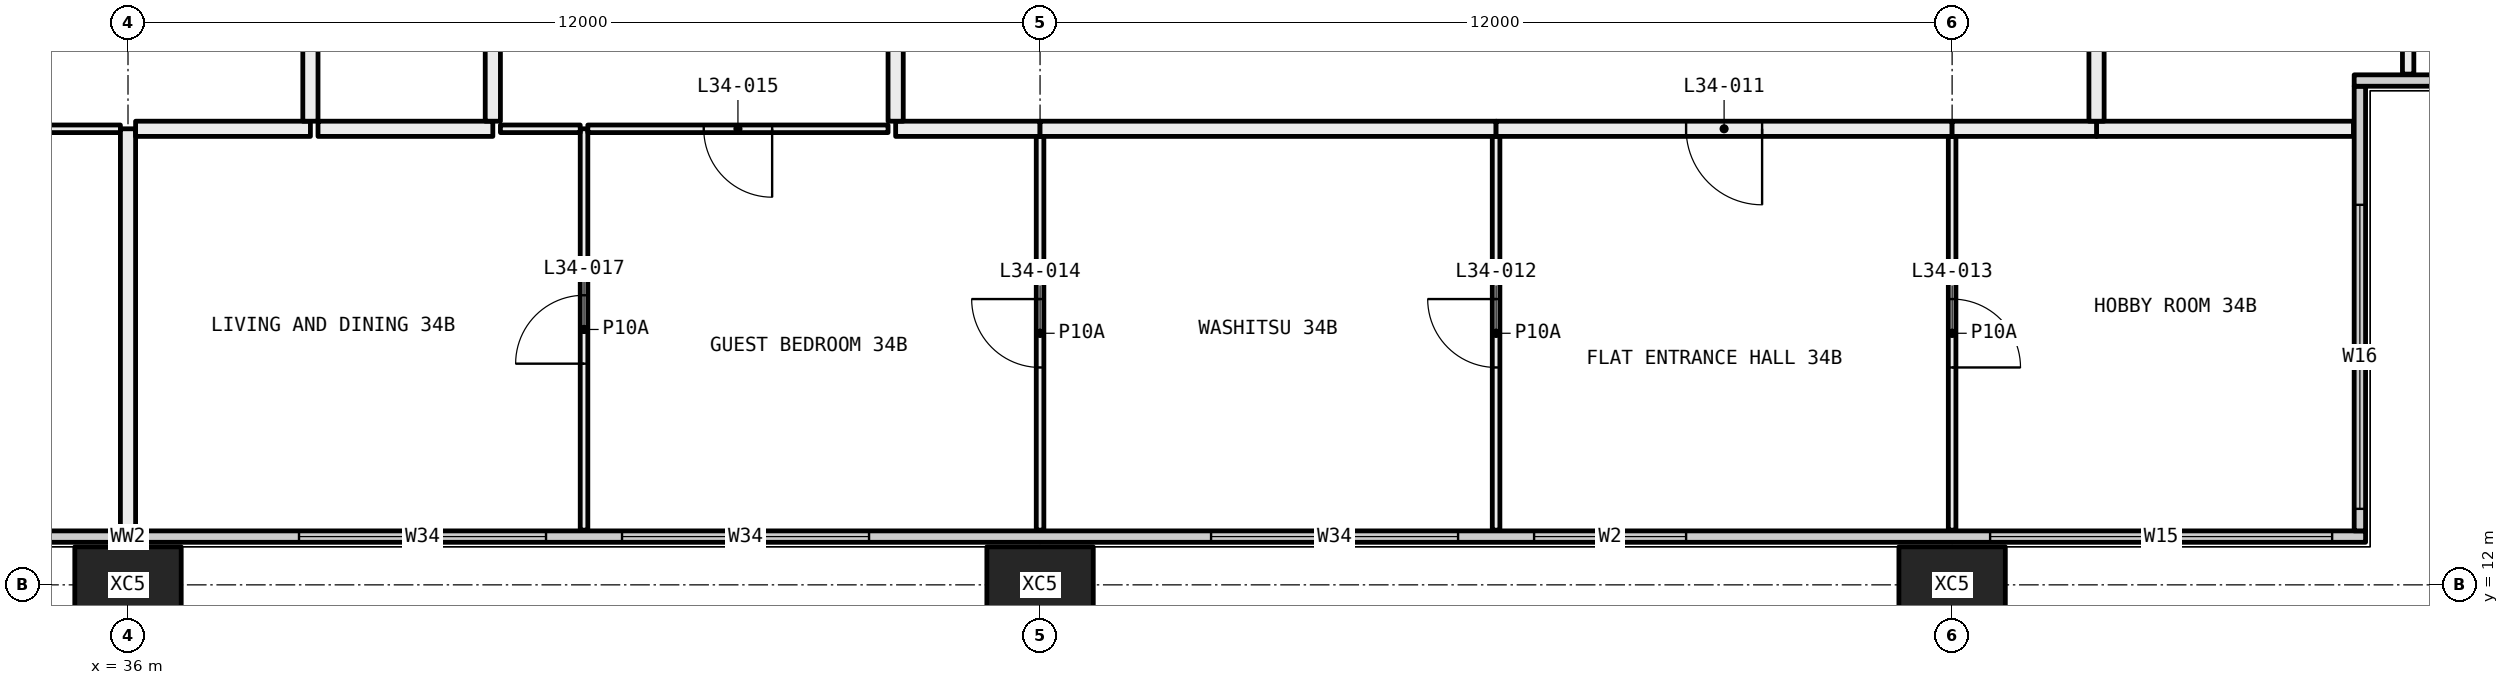
"""IFC4 building model, lengths in metres.
Left out: names, types, materials, properties, quantities, classifications, styles, units other than length and angle.
Written with IfcOpenShell. Run it as: python <this file> out.ifc"""

import sys

from ifc_helpers import new_model, si_unit, direction, frame, frame_2d, origin, origin_2d, place, context, subcontext, project, spatial, rectangle, hollow_rectangle, extrude, element, fill, save


model = new_model("IFC4")
c1 = context("Model", 3, precision=1e-05, world=origin(), true_north=direction((0.0, 1.0)))
c2 = subcontext(c1, "Body", "Model", "MODEL_VIEW")
j1 = project(units=[si_unit("LENGTHUNIT", "METRE"), si_unit("PLANEANGLEUNIT", "RADIAN")], contexts=[c1])
p1 = place(None, origin())
s1 = spatial("IfcSite", under=j1, at=p1, CompositionType="ELEMENT")
p2 = place(p1, origin())
s2 = spatial("IfcBuilding", under=s1, at=p2, CompositionType="ELEMENT")
p3 = place(p2, frame((0.0, 0.0, 131.1)))
s3 = spatial("IfcBuildingStorey", under=s2, at=p3, CompositionType="ELEMENT", Elevation=131.1)
for number, where, z_axis, x_axis in (
    (1, (36.0, 12.0, -0.4), (0.0, 0.0, 1.0), (1.0, 0.0, 0.0)),
    (2, (48.0, 12.0, -0.4), (0.0, 0.0, 1.0), (1.0, 0.0, 0.0)),
    (3, (60.0, 12.0, -0.4), (0.0, 0.0, 1.0), (1.0, 0.0, 0.0)),
):
    element("IfcColumn", number, at=place(p3, frame(where, z_axis=z_axis, x_axis=x_axis)), inside=s3, PredefinedType="COLUMN", context=c2, shape_type="SweptSolid", body=[
        extrude(hollow_rectangle(XDim=1.4, YDim=1.0, WallThickness=0.055, at=origin_2d()), origin(), (0.0, 0.0, 1.0), 3.45),
    ])
p4 = place(p3, frame((6.56, 12.635, 0.0), z_axis=(0.0, 0.0, 1.0), x_axis=(1.0, 0.0, 0.0)))
e4 = element("IfcWall", 4, at=p4, inside=s3, PredefinedType="ELEMENTEDWALL", context=c2, shape_type="SweptSolid", body=[
    extrude(rectangle(XDim=58.88, YDim=0.15, at=frame_2d((29.44, 0.0))), origin(), (0.0, 0.0, 1.0), 3.05),
])
p5 = place(p4, frame((0.44, 0.0, 0.45)))
e5 = element("IfcOpeningElement", 5, at=p5, cuts=e4, PredefinedType="OPENING", context=c2, shape_type="SweptSolid", body=[
    extrude(rectangle(XDim=4.5, YDim=2.55, at=frame_2d((2.25, 1.275))), frame((0.0, 0.085, 0.0), z_axis=(0.0, -1.0, 0.0), x_axis=(1.0, 0.0, 0.0)), (0.0, 0.0, 1.0), 0.17),
])
p6 = place(p4, frame((7.69, 0.0, 0.45)))
e6 = element("IfcOpeningElement", 6, at=p6, cuts=e4, PredefinedType="OPENING", context=c2, shape_type="SweptSolid", body=[
    extrude(rectangle(XDim=3.25, YDim=2.55, at=frame_2d((1.625, 1.275))), frame((0.0, 0.085, 0.0), z_axis=(0.0, -1.0, 0.0), x_axis=(1.0, 0.0, 0.0)), (0.0, 0.0, 1.0), 0.17),
])
p7 = place(p4, frame((11.94, 0.0, 0.45)))
e7 = element("IfcOpeningElement", 7, at=p7, cuts=e4, PredefinedType="OPENING", context=c2, shape_type="SweptSolid", body=[
    extrude(rectangle(XDim=3.25, YDim=2.55, at=frame_2d((1.625, 1.275))), frame((0.0, 0.085, 0.0), z_axis=(0.0, -1.0, 0.0), x_axis=(1.0, 0.0, 0.0)), (0.0, 0.0, 1.0), 0.17),
])
p8 = place(p4, frame((19.69, 0.0, 0.45)))
e8 = element("IfcOpeningElement", 8, at=p8, cuts=e4, PredefinedType="OPENING", context=c2, shape_type="SweptSolid", body=[
    extrude(rectangle(XDim=3.25, YDim=2.55, at=frame_2d((1.625, 1.275))), frame((0.0, 0.085, 0.0), z_axis=(0.0, -1.0, 0.0), x_axis=(1.0, 0.0, 0.0)), (0.0, 0.0, 1.0), 0.17),
])
p9 = place(p4, frame((23.94, 0.0, 0.45)))
e9 = element("IfcOpeningElement", 9, at=p9, cuts=e4, PredefinedType="OPENING", context=c2, shape_type="SweptSolid", body=[
    extrude(rectangle(XDim=2.0, YDim=2.55, at=frame_2d((1.0, 1.275))), frame((0.0, 0.085, 0.0), z_axis=(0.0, -1.0, 0.0), x_axis=(1.0, 0.0, 0.0)), (0.0, 0.0, 1.0), 0.17),
])
p10 = place(p4, frame((31.69, 0.0, 0.45)))
e10 = element("IfcOpeningElement", 10, at=p10, cuts=e4, PredefinedType="OPENING", context=c2, shape_type="SweptSolid", body=[
    extrude(rectangle(XDim=3.25, YDim=2.55, at=frame_2d((1.625, 1.275))), frame((0.0, 0.085, 0.0), z_axis=(0.0, -1.0, 0.0), x_axis=(1.0, 0.0, 0.0)), (0.0, 0.0, 1.0), 0.17),
])
p11 = place(p4, frame((35.94, 0.0, 0.45)))
e11 = element("IfcOpeningElement", 11, at=p11, cuts=e4, PredefinedType="OPENING", context=c2, shape_type="SweptSolid", body=[
    extrude(rectangle(XDim=3.25, YDim=2.55, at=frame_2d((1.625, 1.275))), frame((0.0, 0.085, 0.0), z_axis=(0.0, -1.0, 0.0), x_axis=(1.0, 0.0, 0.0)), (0.0, 0.0, 1.0), 0.17),
])
p12 = place(p4, frame((43.69, 0.0, 0.45)))
e12 = element("IfcOpeningElement", 12, at=p12, cuts=e4, PredefinedType="OPENING", context=c2, shape_type="SweptSolid", body=[
    extrude(rectangle(XDim=3.25, YDim=2.55, at=frame_2d((1.625, 1.275))), frame((0.0, 0.085, 0.0), z_axis=(0.0, -1.0, 0.0), x_axis=(1.0, 0.0, 0.0)), (0.0, 0.0, 1.0), 0.17),
])
p13 = place(p4, frame((47.94, 0.0, 0.45)))
e13 = element("IfcOpeningElement", 13, at=p13, cuts=e4, PredefinedType="OPENING", context=c2, shape_type="SweptSolid", body=[
    extrude(rectangle(XDim=2.0, YDim=2.55, at=frame_2d((1.0, 1.275))), frame((0.0, 0.085, 0.0), z_axis=(0.0, -1.0, 0.0), x_axis=(1.0, 0.0, 0.0)), (0.0, 0.0, 1.0), 0.17),
])
p14 = place(p4, frame((53.94, 0.0, 0.45)))
e14 = element("IfcOpeningElement", 14, at=p14, cuts=e4, PredefinedType="OPENING", context=c2, shape_type="SweptSolid", body=[
    extrude(rectangle(XDim=4.5, YDim=2.55, at=frame_2d((2.25, 1.275))), frame((0.0, 0.085, 0.0), z_axis=(0.0, -1.0, 0.0), x_axis=(1.0, 0.0, 0.0)), (0.0, 0.0, 1.0), 0.17),
])
p15 = place(p3, frame((65.365, 12.71, 0.0), z_axis=(0.0, 0.0, 1.0), x_axis=(0.0, 1.0, 0.0)))
e15 = element("IfcWall", 15, at=p15, inside=s3, PredefinedType="ELEMENTEDWALL", context=c2, shape_type="SweptSolid", body=[
    extrude(rectangle(XDim=5.85, YDim=0.15, at=frame_2d((2.925, 0.0))), origin(), (0.0, 0.0, 1.0), 3.05),
])
p16 = place(p15, frame((0.29, 0.0, 0.45)))
e16 = element("IfcOpeningElement", 16, at=p16, cuts=e15, PredefinedType="OPENING", context=c2, shape_type="SweptSolid", body=[
    extrude(rectangle(XDim=4.0, YDim=2.55, at=frame_2d((2.0, 1.275))), frame((0.0, 0.085, 0.0), z_axis=(0.0, -1.0, 0.0), x_axis=(1.0, 0.0, 0.0)), (0.0, 0.0, 1.0), 0.17),
])
p17 = place(p3, frame((65.29, 18.635, 0.0), z_axis=(0.0, 0.0, 1.0), x_axis=(1.0, 0.0, 0.0)))
e17 = element("IfcWall", 17, at=p17, inside=s3, PredefinedType="ELEMENTEDWALL", context=c2, shape_type="SweptSolid", body=[
    extrude(rectangle(XDim=6.15, YDim=0.15, at=frame_2d((3.075, 0.0))), origin(), (0.0, 0.0, 1.0), 3.05),
])
p18 = place(p17, frame((1.71, 0.0, 0.45)))
e18 = element("IfcOpeningElement", 18, at=p18, cuts=e17, PredefinedType="OPENING", context=c2, shape_type="SweptSolid", body=[
    extrude(rectangle(XDim=4.0, YDim=2.55, at=frame_2d((2.0, 1.275))), frame((0.0, 0.085, 0.0), z_axis=(0.0, -1.0, 0.0), x_axis=(1.0, 0.0, 0.0)), (0.0, 0.0, 1.0), 0.17),
])
p19 = place(p3, frame((35.9, 18.0, 0.0), z_axis=(0.0, 0.0, 1.0), x_axis=(-1.0, 0.0, 0.0)))
e19 = element("IfcWall", 19, at=p19, inside=s3, PredefinedType="PARTITIONING", context=c2, shape_type="SweptSolid", body=[
    extrude(rectangle(XDim=1.4, YDim=0.1, at=frame_2d((0.7, 0.0))), origin(), (0.0, 0.0, 1.0), 3.05),
])
p20 = place(p3, frame((36.0, 12.72, 0.0), z_axis=(0.0, 0.0, 1.0), x_axis=(0.0, 1.0, 0.0)))
e20 = element("IfcWall", 20, at=p20, inside=s3, PredefinedType="PARTITIONING", context=c2, shape_type="SweptSolid", body=[
    extrude(rectangle(XDim=5.28, YDim=0.2, at=frame_2d((2.64, 0.0))), origin(), (0.0, 0.0, 1.0), 2.45),
])
p21 = place(p3, frame((36.1, 18.0, 0.0), z_axis=(0.0, 0.0, 1.0), x_axis=(1.0, 0.0, 0.0)))
e21 = element("IfcWall", 21, at=p21, inside=s3, PredefinedType="PARTITIONING", context=c2, shape_type="SweptSolid", body=[
    extrude(rectangle(XDim=2.3, YDim=0.2, at=frame_2d((1.15, 0.0))), origin(), (0.0, 0.0, 1.0), 3.05),
])
p22 = place(p3, frame((38.4, 18.1, 0.0), z_axis=(0.0, 0.0, 1.0), x_axis=(0.0, 1.0, 0.0)))
e22 = element("IfcWall", 22, at=p22, inside=s3, PredefinedType="PARTITIONING", context=c2, shape_type="SweptSolid", body=[
    extrude(rectangle(XDim=6.2, YDim=0.2, at=frame_2d((3.1, 0.0))), origin(), (0.0, 0.0, 1.0), 2.45),
])
p23 = place(p3, frame((42.0, 12.72, 0.0), z_axis=(0.0, 0.0, 1.0), x_axis=(0.0, 1.0, 0.0)))
e23 = element("IfcWall", 23, at=p23, inside=s3, PredefinedType="PARTITIONING", context=c2, shape_type="SweptSolid", body=[
    extrude(rectangle(XDim=5.28, YDim=0.1, at=frame_2d((2.64, 0.0))), origin(), (0.0, 0.0, 1.0), 3.05),
])
p24 = place(p23, frame((2.19, 0.0, 0.0)))
e24 = element("IfcOpeningElement", 24, at=p24, cuts=e23, PredefinedType="OPENING", context=c2, shape_type="SweptSolid", body=[
    extrude(rectangle(XDim=0.9, YDim=2.1, at=frame_2d((0.45, 1.05))), frame((0.0, 0.06, 0.0), z_axis=(0.0, -1.0, 0.0), x_axis=(1.0, 0.0, 0.0)), (0.0, 0.0, 1.0), 0.12),
])
p25 = place(p3, frame((41.95, 18.0, 0.0), z_axis=(0.0, 0.0, 1.0), x_axis=(-1.0, 0.0, 0.0)))
e25 = element("IfcWall", 25, at=p25, inside=s3, PredefinedType="PARTITIONING", context=c2, shape_type="SweptSolid", body=[
    extrude(rectangle(XDim=1.05, YDim=0.1, at=frame_2d((0.525, 0.0))), origin(), (0.0, 0.0, 1.0), 3.05),
])
p26 = place(p3, frame((40.8, 18.0, 0.0), z_axis=(0.0, 0.0, 1.0), x_axis=(-1.0, 0.0, 0.0)))
e26 = element("IfcWall", 26, at=p26, inside=s3, PredefinedType="PARTITIONING", context=c2, shape_type="SweptSolid", body=[
    extrude(rectangle(XDim=2.3, YDim=0.2, at=frame_2d((1.15, 0.0))), origin(), (0.0, 0.0, 1.0), 3.05),
])
p27 = place(p3, frame((48.0, 12.72, 0.0), z_axis=(0.0, 0.0, 1.0), x_axis=(0.0, 1.0, 0.0)))
e27 = element("IfcWall", 27, at=p27, inside=s3, PredefinedType="PARTITIONING", context=c2, shape_type="SweptSolid", body=[
    extrude(rectangle(XDim=5.18, YDim=0.1, at=frame_2d((2.59, 0.0))), origin(), (0.0, 0.0, 1.0), 3.05),
])
p28 = place(p27, frame((2.14, 0.0, 0.0)))
e28 = element("IfcOpeningElement", 28, at=p28, cuts=e27, PredefinedType="OPENING", context=c2, shape_type="SweptSolid", body=[
    extrude(rectangle(XDim=0.9, YDim=2.1, at=frame_2d((0.45, 1.05))), frame((0.0, 0.06, 0.0), z_axis=(0.0, -1.0, 0.0), x_axis=(1.0, 0.0, 0.0)), (0.0, 0.0, 1.0), 0.12),
])
p29 = place(p3, frame((46.0, 18.0, 0.0), z_axis=(0.0, 0.0, 1.0), x_axis=(-1.0, 0.0, 0.0)))
e29 = element("IfcWall", 29, at=p29, inside=s3, PredefinedType="PARTITIONING", context=c2, shape_type="SweptSolid", body=[
    extrude(rectangle(XDim=3.95, YDim=0.1, at=frame_2d((1.975, 0.0))), origin(), (0.0, 0.0, 1.0), 3.05),
])
p30 = place(p29, frame((1.525, 0.0, 0.0)))
e30 = element("IfcOpeningElement", 30, at=p30, cuts=e29, PredefinedType="OPENING", context=c2, shape_type="SweptSolid", body=[
    extrude(rectangle(XDim=0.9, YDim=2.1, at=frame_2d((0.45, 1.05))), frame((0.0, 0.06, 0.0), z_axis=(0.0, -1.0, 0.0), x_axis=(1.0, 0.0, 0.0)), (0.0, 0.0, 1.0), 0.12),
])
p31 = place(p3, frame((48.0, 18.0, 0.0), z_axis=(0.0, 0.0, 1.0), x_axis=(-1.0, 0.0, 0.0)))
e31 = element("IfcWall", 31, at=p31, inside=s3, PredefinedType="PARTITIONING", context=c2, shape_type="SweptSolid", body=[
    extrude(rectangle(XDim=1.9, YDim=0.2, at=frame_2d((0.95, 0.0))), origin(), (0.0, 0.0, 1.0), 3.05),
])
p32 = place(p3, frame((54.0, 12.72, 0.0), z_axis=(0.0, 0.0, 1.0), x_axis=(0.0, 1.0, 0.0)))
e32 = element("IfcWall", 32, at=p32, inside=s3, PredefinedType="PARTITIONING", context=c2, shape_type="SweptSolid", body=[
    extrude(rectangle(XDim=5.18, YDim=0.1, at=frame_2d((2.59, 0.0))), origin(), (0.0, 0.0, 1.0), 3.05),
])
p33 = place(p32, frame((2.14, 0.0, 0.0)))
e33 = element("IfcOpeningElement", 33, at=p33, cuts=e32, PredefinedType="OPENING", context=c2, shape_type="SweptSolid", body=[
    extrude(rectangle(XDim=0.9, YDim=2.1, at=frame_2d((0.45, 1.05))), frame((0.0, 0.06, 0.0), z_axis=(0.0, -1.0, 0.0), x_axis=(1.0, 0.0, 0.0)), (0.0, 0.0, 1.0), 0.12),
])
p34 = place(p3, frame((54.0, 18.0, 0.0), z_axis=(0.0, 0.0, 1.0), x_axis=(-1.0, 0.0, 0.0)))
e34 = element("IfcWall", 34, at=p34, inside=s3, PredefinedType="PARTITIONING", context=c2, shape_type="SweptSolid", body=[
    extrude(rectangle(XDim=6.0, YDim=0.2, at=frame_2d((3.0, 0.0))), origin(), (0.0, 0.0, 1.0), 3.05),
])
p35 = place(p3, frame((60.0, 12.72, 0.0), z_axis=(0.0, 0.0, 1.0), x_axis=(0.0, 1.0, 0.0)))
e35 = element("IfcWall", 35, at=p35, inside=s3, PredefinedType="PARTITIONING", context=c2, shape_type="SweptSolid", body=[
    extrude(rectangle(XDim=5.18, YDim=0.1, at=frame_2d((2.59, 0.0))), origin(), (0.0, 0.0, 1.0), 3.05),
])
p36 = place(p35, frame((2.14, 0.0, 0.0)))
e36 = element("IfcOpeningElement", 36, at=p36, cuts=e35, PredefinedType="OPENING", context=c2, shape_type="SweptSolid", body=[
    extrude(rectangle(XDim=0.9, YDim=2.1, at=frame_2d((0.45, 1.05))), frame((0.0, 0.06, 0.0), z_axis=(0.0, -1.0, 0.0), x_axis=(1.0, 0.0, 0.0)), (0.0, 0.0, 1.0), 0.12),
])
p37 = place(p3, frame((60.0, 18.0, 0.0), z_axis=(0.0, 0.0, 1.0), x_axis=(-1.0, 0.0, 0.0)))
e37 = element("IfcWall", 37, at=p37, inside=s3, PredefinedType="PARTITIONING", context=c2, shape_type="SweptSolid", body=[
    extrude(rectangle(XDim=6.0, YDim=0.2, at=frame_2d((3.0, 0.0))), origin(), (0.0, 0.0, 1.0), 3.05),
])
p38 = place(p37, frame((2.5, 0.0, 0.0)))
e38 = element("IfcOpeningElement", 38, at=p38, cuts=e37, PredefinedType="OPENING", context=c2, shape_type="SweptSolid", body=[
    extrude(rectangle(XDim=1.0, YDim=2.1, at=frame_2d((0.5, 1.05))), frame((0.0, 0.11, 0.0), z_axis=(0.0, -1.0, 0.0), x_axis=(1.0, 0.0, 0.0)), (0.0, 0.0, 1.0), 0.22),
])
p39 = place(p3, frame((65.28, 18.0, 0.0), z_axis=(0.0, 0.0, 1.0), x_axis=(-1.0, 0.0, 0.0)))
e39 = element("IfcWall", 39, at=p39, inside=s3, PredefinedType="PARTITIONING", context=c2, shape_type="SweptSolid", body=[
    extrude(rectangle(XDim=3.38, YDim=0.2, at=frame_2d((1.69, 0.0))), origin(), (0.0, 0.0, 1.0), 3.05),
])
p40 = place(p3, frame((61.9, 18.0, 0.0), z_axis=(0.0, 0.0, 1.0), x_axis=(-1.0, 0.0, 0.0)))
e40 = element("IfcWall", 40, at=p40, inside=s3, PredefinedType="PARTITIONING", context=c2, shape_type="SweptSolid", body=[
    extrude(rectangle(XDim=1.9, YDim=0.2, at=frame_2d((0.95, 0.0))), origin(), (0.0, 0.0, 1.0), 3.05),
])
p41 = place(p3, frame((40.8, 23.9, 0.0), z_axis=(0.0, 0.0, 1.0), x_axis=(0.0, -1.0, 0.0)))
e41 = element("IfcWall", 41, at=p41, inside=s3, PredefinedType="PARTITIONING", context=c2, shape_type="SweptSolid", body=[
    extrude(rectangle(XDim=5.8, YDim=0.2, at=frame_2d((2.9, 0.0))), origin(), (0.0, 0.0, 1.0), 3.05),
])
p42 = place(p3, frame((46.1, 18.1, 0.0), z_axis=(0.0, 0.0, 1.0), x_axis=(0.0, 1.0, 0.0)))
e42 = element("IfcWall", 42, at=p42, inside=s3, PredefinedType="PARTITIONING", context=c2, shape_type="SweptSolid", body=[
    extrude(rectangle(XDim=6.2, YDim=0.2, at=frame_2d((3.1, 0.0))), origin(), (0.0, 0.0, 1.0), 2.45),
])
p43 = place(p3, frame((66.0, 21.0, 0.0), z_axis=(0.0, 0.0, 1.0), x_axis=(0.0, -1.0, 0.0)))
e43 = element("IfcWall", 43, at=p43, inside=s3, PredefinedType="PARTITIONING", context=c2, shape_type="SweptSolid", body=[
    extrude(rectangle(XDim=2.28, YDim=0.15, at=frame_2d((1.14, 0.0))), origin(), (0.0, 0.0, 1.0), 3.05),
])
p44 = place(p3, frame((61.9, 21.0, 0.0), z_axis=(0.0, 0.0, 1.0), x_axis=(0.0, -1.0, 0.0)))
e44 = element("IfcWall", 44, at=p44, inside=s3, PredefinedType="PARTITIONING", context=c2, shape_type="SweptSolid", body=[
    extrude(rectangle(XDim=2.9, YDim=0.2, at=frame_2d((1.45, 0.0))), origin(), (0.0, 0.0, 1.0), 3.05),
])
p45 = place(p10, origin())
e45 = element("IfcWindow", 45, at=p45, inside=s3, PartitioningType="SINGLE_PANEL", PredefinedType="WINDOW", context=c2, shape_type="SweptSolid", body=[
    extrude(rectangle(XDim=3.25, YDim=2.55, at=frame_2d((1.625, 1.275))), frame((0.0, 0.03, 0.0), z_axis=(0.0, -1.0, 0.0), x_axis=(1.0, 0.0, 0.0)), (0.0, 0.0, 1.0), 0.06),
])
fill(e10, e45)
p46 = place(p11, origin())
e46 = element("IfcWindow", 46, at=p46, inside=s3, PartitioningType="SINGLE_PANEL", PredefinedType="WINDOW", context=c2, shape_type="SweptSolid", body=[
    extrude(rectangle(XDim=3.25, YDim=2.55, at=frame_2d((1.625, 1.275))), frame((0.0, 0.03, 0.0), z_axis=(0.0, -1.0, 0.0), x_axis=(1.0, 0.0, 0.0)), (0.0, 0.0, 1.0), 0.06),
])
fill(e11, e46)
p47 = place(p12, origin())
e47 = element("IfcWindow", 47, at=p47, inside=s3, PartitioningType="SINGLE_PANEL", PredefinedType="WINDOW", context=c2, shape_type="SweptSolid", body=[
    extrude(rectangle(XDim=3.25, YDim=2.55, at=frame_2d((1.625, 1.275))), frame((0.0, 0.03, 0.0), z_axis=(0.0, -1.0, 0.0), x_axis=(1.0, 0.0, 0.0)), (0.0, 0.0, 1.0), 0.06),
])
fill(e12, e47)
p48 = place(p13, origin())
e48 = element("IfcWindow", 48, at=p48, inside=s3, PartitioningType="SINGLE_PANEL", PredefinedType="WINDOW", context=c2, shape_type="SweptSolid", body=[
    extrude(rectangle(XDim=2.0, YDim=2.55, at=frame_2d((1.0, 1.275))), frame((0.0, 0.03, 0.0), z_axis=(0.0, -1.0, 0.0), x_axis=(1.0, 0.0, 0.0)), (0.0, 0.0, 1.0), 0.06),
])
fill(e13, e48)
p49 = place(p14, origin())
e49 = element("IfcWindow", 49, at=p49, inside=s3, PartitioningType="SINGLE_PANEL", PredefinedType="WINDOW", context=c2, shape_type="SweptSolid", body=[
    extrude(rectangle(XDim=4.5, YDim=2.55, at=frame_2d((2.25, 1.275))), frame((0.0, 0.03, 0.0), z_axis=(0.0, -1.0, 0.0), x_axis=(1.0, 0.0, 0.0)), (0.0, 0.0, 1.0), 0.06),
])
fill(e14, e49)
p50 = place(p16, origin())
e50 = element("IfcWindow", 50, at=p50, inside=s3, PartitioningType="SINGLE_PANEL", PredefinedType="WINDOW", context=c2, shape_type="SweptSolid", body=[
    extrude(rectangle(XDim=4.0, YDim=2.55, at=frame_2d((2.0, 1.275))), frame((0.0, 0.03, 0.0), z_axis=(0.0, -1.0, 0.0), x_axis=(1.0, 0.0, 0.0)), (0.0, 0.0, 1.0), 0.06),
])
fill(e16, e50)
p51 = place(p38, origin())
e51 = element("IfcDoor", 51, at=p51, inside=s3, OperationType="SINGLE_SWING_RIGHT", PredefinedType="DOOR", context=c2, shape_type="SweptSolid", body=[
    extrude(rectangle(XDim=1.0, YDim=2.1, at=frame_2d((0.5, 1.05))), frame((0.0, 0.025, 0.0), z_axis=(0.0, -1.0, 0.0), x_axis=(1.0, 0.0, 0.0)), (0.0, 0.0, 1.0), 0.05),
])
fill(e38, e51)
p52 = place(p33, origin())
e52 = element("IfcDoor", 52, at=p52, inside=s3, OperationType="SINGLE_SWING_LEFT", PredefinedType="DOOR", context=c2, shape_type="SweptSolid", body=[
    extrude(rectangle(XDim=0.9, YDim=2.1, at=frame_2d((0.45, 1.05))), frame((0.0, 0.025, 0.0), z_axis=(0.0, -1.0, 0.0), x_axis=(1.0, 0.0, 0.0)), (0.0, 0.0, 1.0), 0.05),
])
fill(e33, e52)
p53 = place(p36, frame((0.9, 0.0, 0.0), x_axis=(-1.0, 0.0, 0.0)))
e53 = element("IfcDoor", 53, at=p53, inside=s3, OperationType="SINGLE_SWING_LEFT", PredefinedType="DOOR", context=c2, shape_type="SweptSolid", body=[
    extrude(rectangle(XDim=0.9, YDim=2.1, at=frame_2d((0.45, 1.05))), frame((0.0, 0.025, 0.0), z_axis=(0.0, -1.0, 0.0), x_axis=(1.0, 0.0, 0.0)), (0.0, 0.0, 1.0), 0.05),
])
fill(e36, e53)
p54 = place(p28, origin())
e54 = element("IfcDoor", 54, at=p54, inside=s3, OperationType="SINGLE_SWING_LEFT", PredefinedType="DOOR", context=c2, shape_type="SweptSolid", body=[
    extrude(rectangle(XDim=0.9, YDim=2.1, at=frame_2d((0.45, 1.05))), frame((0.0, 0.025, 0.0), z_axis=(0.0, -1.0, 0.0), x_axis=(1.0, 0.0, 0.0)), (0.0, 0.0, 1.0), 0.05),
])
fill(e28, e54)
p55 = place(p30, origin())
e55 = element("IfcDoor", 55, at=p55, inside=s3, OperationType="SINGLE_SWING_RIGHT", PredefinedType="DOOR", context=c2, shape_type="SweptSolid", body=[
    extrude(rectangle(XDim=0.9, YDim=2.1, at=frame_2d((0.45, 1.05))), frame((0.0, 0.025, 0.0), z_axis=(0.0, -1.0, 0.0), x_axis=(1.0, 0.0, 0.0)), (0.0, 0.0, 1.0), 0.05),
])
fill(e30, e55)
p56 = place(p24, origin())
e56 = element("IfcDoor", 56, at=p56, inside=s3, OperationType="SINGLE_SWING_RIGHT", PredefinedType="DOOR", context=c2, shape_type="SweptSolid", body=[
    extrude(rectangle(XDim=0.9, YDim=2.1, at=frame_2d((0.45, 1.05))), frame((0.0, 0.025, 0.0), z_axis=(0.0, -1.0, 0.0), x_axis=(1.0, 0.0, 0.0)), (0.0, 0.0, 1.0), 0.05),
])
fill(e24, e56)
save(model, sys.argv[1])
